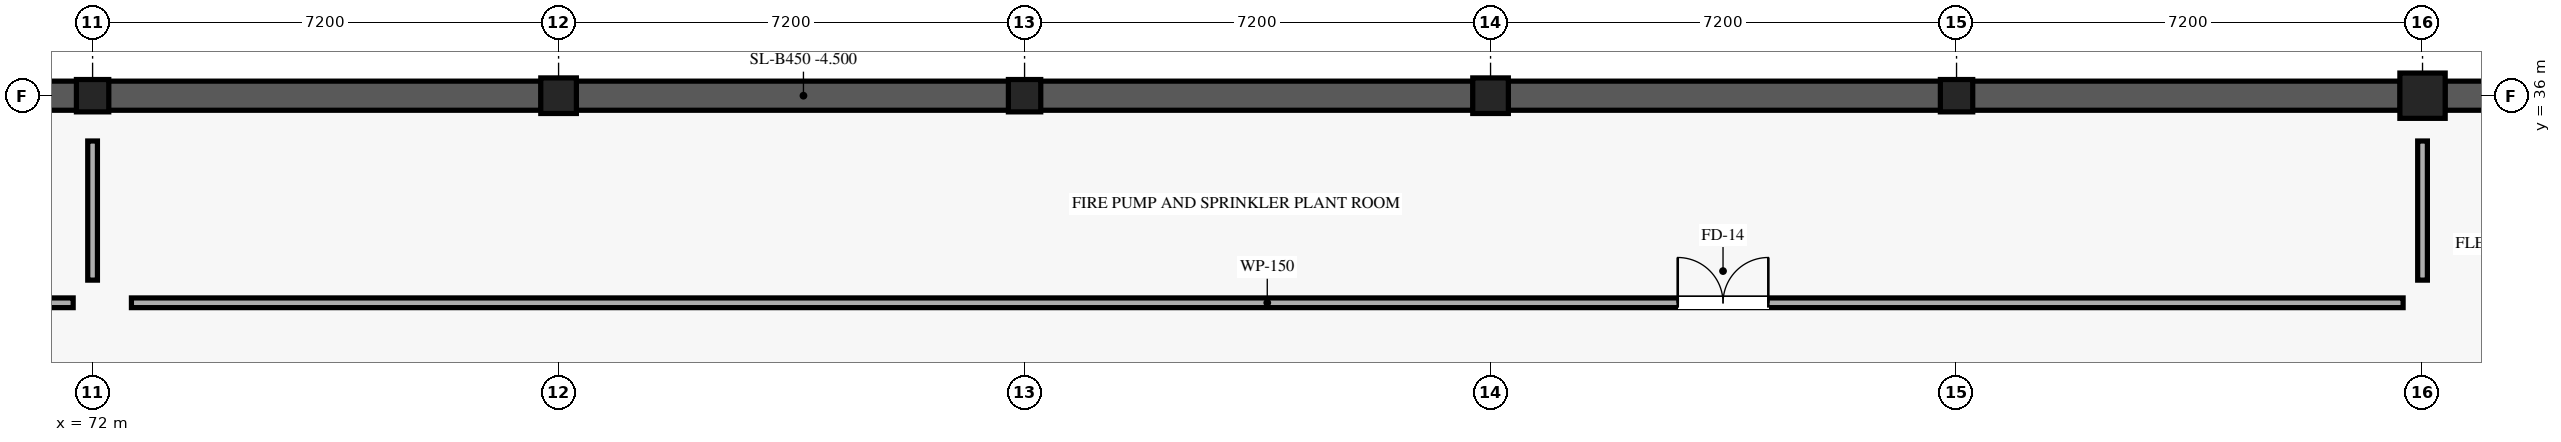
"""IFC4 building model, lengths in metres.
Left out: names, types, materials, properties, quantities, classifications, styles, units other than length and angle.
Written with IfcOpenShell. Run it as: python <this file> out.ifc"""

import sys

from ifc_helpers import new_model, si_unit, direction, frame, frame_2d, origin, origin_2d, place, context, subcontext, project, spatial, rectangle, extrude, element, fill, save


model = new_model("IFC4")
c1 = context("Model", 3, precision=1e-05, world=origin(), true_north=direction((0.0, 1.0)))
c2 = subcontext(c1, "Body", "Model", "MODEL_VIEW")
j1 = project(units=[si_unit("LENGTHUNIT", "METRE"), si_unit("PLANEANGLEUNIT", "RADIAN")], contexts=[c1])
p1 = place(None, origin())
s1 = spatial("IfcSite", under=j1, at=p1, CompositionType="ELEMENT")
p2 = place(p1, origin())
s2 = spatial("IfcBuilding", under=s1, at=p2, CompositionType="ELEMENT")
p3 = place(p2, frame((0.0, 0.0, -4.5)))
s3 = spatial("IfcBuildingStorey", under=s2, at=p3, CompositionType="ELEMENT", Elevation=-4.5)
p4 = place(p3, frame((72.0, 36.0, 0.0), z_axis=(0.0, 0.0, 1.0), x_axis=(1.0, 0.0, 0.0)))
e1 = element("IfcColumn", 1, at=p4, inside=s3, PredefinedType="COLUMN", context=c2, shape_type="SweptSolid", body=[
    extrude(rectangle(XDim=0.5, YDim=0.5, at=origin_2d()), origin(), (0.0, 0.0, 1.0), 4.5),
])
p5 = place(p3, frame((79.2, 36.0, 0.0), z_axis=(0.0, 0.0, 1.0), x_axis=(1.0, 0.0, 0.0)))
e2 = element("IfcColumn", 2, at=p5, inside=s3, PredefinedType="COLUMN", context=c2, shape_type="SweptSolid", body=[
    extrude(rectangle(XDim=0.55, YDim=0.55, at=origin_2d()), origin(), (0.0, 0.0, 1.0), 4.5),
])
p6 = place(p3, frame((86.4, 36.0, 0.0), z_axis=(0.0, 0.0, 1.0), x_axis=(1.0, 0.0, 0.0)))
e3 = element("IfcColumn", 3, at=p6, inside=s3, PredefinedType="COLUMN", context=c2, shape_type="SweptSolid", body=[
    extrude(rectangle(XDim=0.5, YDim=0.5, at=origin_2d()), origin(), (0.0, 0.0, 1.0), 4.5),
])
p7 = place(p3, frame((93.6, 36.0, 0.0), z_axis=(0.0, 0.0, 1.0), x_axis=(1.0, 0.0, 0.0)))
e4 = element("IfcColumn", 4, at=p7, inside=s3, PredefinedType="COLUMN", context=c2, shape_type="SweptSolid", body=[
    extrude(rectangle(XDim=0.55, YDim=0.55, at=origin_2d()), origin(), (0.0, 0.0, 1.0), 4.5),
])
p8 = place(p3, frame((100.8, 36.0, 0.0), z_axis=(0.0, 0.0, 1.0), x_axis=(1.0, 0.0, 0.0)))
e5 = element("IfcColumn", 5, at=p8, inside=s3, PredefinedType="COLUMN", context=c2, shape_type="SweptSolid", body=[
    extrude(rectangle(XDim=0.5, YDim=0.5, at=origin_2d()), origin(), (0.0, 0.0, 1.0), 4.5),
])
p9 = place(p3, frame((108.0, 36.0, 0.0), z_axis=(0.0, 0.0, 1.0), x_axis=(1.0, 0.0, 0.0)))
e6 = element("IfcColumn", 6, at=p9, inside=s3, PredefinedType="COLUMN", context=c2, shape_type="SweptSolid", body=[
    extrude(rectangle(XDim=0.7, YDim=0.7, at=origin_2d()), origin(), (0.0, 0.0, 1.0), 4.5),
])
for number, where, z_axis, x_axis in (
    (7, (65.07, 36.0, 0.0), (0.0, 0.0, 1.0), (1.0, 0.0, 0.0)),
    (8, (72.245, 36.0, 0.0), (0.0, 0.0, 1.0), (1.0, 0.0, 0.0)),
):
    element("IfcWall", number, at=place(p3, frame(where, z_axis=z_axis, x_axis=x_axis)), inside=s3, PredefinedType="USERDEFINED", context=c2, shape_type="SweptSolid", body=[
        extrude(rectangle(XDim=6.685, YDim=0.45, at=frame_2d((3.342, 0.0))), origin(), (0.0, 0.0, 1.0), 4.25),
    ])
for number, where, z_axis, x_axis in (
    (9, (79.47, 36.0, 0.0), (0.0, 0.0, 1.0), (1.0, 0.0, 0.0)),
    (10, (86.645, 36.0, 0.0), (0.0, 0.0, 1.0), (1.0, 0.0, 0.0)),
):
    element("IfcWall", number, at=place(p3, frame(where, z_axis=z_axis, x_axis=x_axis)), inside=s3, PredefinedType="USERDEFINED", context=c2, shape_type="SweptSolid", body=[
        extrude(rectangle(XDim=6.685, YDim=0.45, at=frame_2d((3.343, 0.0))), origin(), (0.0, 0.0, 1.0), 4.25),
    ])
p10 = place(p3, frame((93.87, 36.0, 0.0), z_axis=(0.0, 0.0, 1.0), x_axis=(1.0, 0.0, 0.0)))
e11 = element("IfcWall", 11, at=p10, inside=s3, PredefinedType="USERDEFINED", context=c2, shape_type="SweptSolid", body=[
    extrude(rectangle(XDim=6.685, YDim=0.45, at=frame_2d((3.342, 0.0))), origin(), (0.0, 0.0, 1.0), 4.25),
])
p11 = place(p3, frame((101.045, 36.0, 0.0), z_axis=(0.0, 0.0, 1.0), x_axis=(1.0, 0.0, 0.0)))
e12 = element("IfcWall", 12, at=p11, inside=s3, PredefinedType="USERDEFINED", context=c2, shape_type="SweptSolid", body=[
    extrude(rectangle(XDim=6.61, YDim=0.45, at=frame_2d((3.305, 0.0))), origin(), (0.0, 0.0, 1.0), 4.25),
])
p12 = place(p3, frame((108.345, 36.0, 0.0), z_axis=(0.0, 0.0, 1.0), x_axis=(1.0, 0.0, 0.0)))
e13 = element("IfcWall", 13, at=p12, inside=s3, PredefinedType="USERDEFINED", context=c2, shape_type="SweptSolid", body=[
    extrude(rectangle(XDim=6.46, YDim=0.45, at=frame_2d((3.23, 0.0))), origin(), (0.0, 0.0, 1.0), 4.25),
])
p13 = place(p3, frame((72.0, 33.15, 0.0), z_axis=(0.0, 0.0, 1.0), x_axis=(0.0, 1.0, 0.0)))
e14 = element("IfcWall", 14, at=p13, inside=s3, PredefinedType="PARTITIONING", context=c2, shape_type="SweptSolid", body=[
    extrude(rectangle(XDim=2.15, YDim=0.15, at=frame_2d((1.075, 0.0))), origin(), (0.0, 0.0, 1.0), 3.59),
])
p14 = place(p3, frame((21.9, 32.8, 0.0), z_axis=(0.0, 0.0, 1.0), x_axis=(1.0, 0.0, 0.0)))
e15 = element("IfcWall", 15, at=p14, inside=s3, PredefinedType="PARTITIONING", context=c2, shape_type="SweptSolid", body=[
    extrude(rectangle(XDim=49.8, YDim=0.15, at=frame_2d((24.9, 0.0))), origin(), (0.0, 0.0, 1.0), 4.25),
])
p15 = place(p14, frame((9.78, 0.0, 0.0)))
e16 = element("IfcOpeningElement", 16, at=p15, cuts=e15, PredefinedType="OPENING", context=c2, shape_type="SweptSolid", body=[
    extrude(rectangle(XDim=1.4, YDim=2.25, at=frame_2d((0.7, 1.125))), frame((0.0, 0.085, 0.0), z_axis=(0.0, -1.0, 0.0), x_axis=(1.0, 0.0, 0.0)), (0.0, 0.0, 1.0), 0.17),
])
p16 = place(p3, frame((108.0, 33.15, 0.0), z_axis=(0.0, 0.0, 1.0), x_axis=(0.0, 1.0, 0.0)))
e17 = element("IfcWall", 17, at=p16, inside=s3, PredefinedType="PARTITIONING", context=c2, shape_type="SweptSolid", body=[
    extrude(rectangle(XDim=2.15, YDim=0.15, at=frame_2d((1.075, 0.0))), origin(), (0.0, 0.0, 1.0), 3.54),
])
p17 = place(p3, frame((72.6, 32.8, 0.0), z_axis=(0.0, 0.0, 1.0), x_axis=(1.0, 0.0, 0.0)))
e18 = element("IfcWall", 18, at=p17, inside=s3, PredefinedType="PARTITIONING", context=c2, shape_type="SweptSolid", body=[
    extrude(rectangle(XDim=35.1, YDim=0.15, at=frame_2d((17.55, 0.0))), origin(), (0.0, 0.0, 1.0), 4.25),
])
p18 = place(p17, frame((23.892, 0.0, 0.0)))
e19 = element("IfcOpeningElement", 19, at=p18, cuts=e18, PredefinedType="OPENING", context=c2, shape_type="SweptSolid", body=[
    extrude(rectangle(XDim=1.4, YDim=2.25, at=frame_2d((0.7, 1.125))), frame((0.0, 0.085, 0.0), z_axis=(0.0, -1.0, 0.0), x_axis=(1.0, 0.0, 0.0)), (0.0, 0.0, 1.0), 0.17),
])
p19 = place(p18, origin())
e20 = element("IfcDoor", 20, at=p19, inside=s3, OperationType="DOUBLE_DOOR_SINGLE_SWING", PredefinedType="DOOR", context=c2, shape_type="SweptSolid", body=[
    extrude(rectangle(XDim=1.4, YDim=2.25, at=frame_2d((0.7, 1.125))), frame((0.0, 0.025, 0.0), z_axis=(0.0, -1.0, 0.0), x_axis=(1.0, 0.0, 0.0)), (0.0, 0.0, 1.0), 0.05),
])
fill(e19, e20)
save(model, sys.argv[1])
